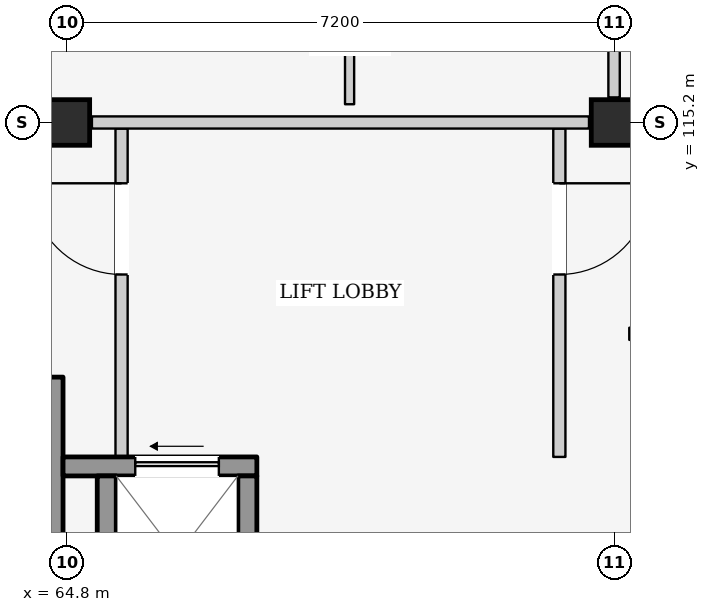
"""IFC4 building model, lengths in metres.
Left out: names, types, materials, properties, quantities, classifications, styles, units other than length and angle.
Written with IfcOpenShell. Run it as: python <this file> out.ifc"""

import sys

from ifc_helpers import new_model, si_unit, direction, frame, frame_2d, origin, origin_2d, place, context, subcontext, project, spatial, rectangle, extrude, element, fill, save


model = new_model("IFC4")
c1 = context("Model", 3, precision=1e-05, world=origin(), true_north=direction((0.0, 1.0)))
c2 = subcontext(c1, "Body", "Model", "MODEL_VIEW")
j1 = project(units=[si_unit("LENGTHUNIT", "METRE"), si_unit("PLANEANGLEUNIT", "RADIAN")], contexts=[c1])
p1 = place(None, origin())
s1 = spatial("IfcSite", under=j1, at=p1, CompositionType="ELEMENT")
p2 = place(p1, origin())
s2 = spatial("IfcBuilding", under=s1, at=p2, CompositionType="ELEMENT")
p3 = place(p2, frame((0.0, 0.0, 25.1)))
s3 = spatial("IfcBuildingStorey", under=s2, at=p3, CompositionType="ELEMENT", Elevation=25.1)
for number, where, z_axis, x_axis in (
    (1, (64.8, 115.2, 0.0), (0.0, 0.0, 1.0), (1.0, 0.0, 0.0)),
    (2, (72.0, 115.2, 0.0), (0.0, 0.0, 1.0), (1.0, 0.0, 0.0)),
):
    element("IfcColumn", number, at=place(p3, frame(where, z_axis=z_axis, x_axis=x_axis)), inside=s3, PredefinedType="COLUMN", context=c2, shape_type="SweptSolid", body=[
        extrude(rectangle(XDim=0.6, YDim=0.6, at=origin_2d()), origin(), (0.0, 0.0, 1.0), 3.2),
    ])
p4 = place(p3, frame((64.6, 108.15, 0.0), z_axis=(0.0, 0.0, 1.0), x_axis=(0.0, 1.0, 0.0)))
e3 = element("IfcWall", 3, at=p4, inside=s3, PredefinedType="SHEAR", context=c2, shape_type="SweptSolid", body=[
    extrude(rectangle(XDim=3.7, YDim=0.3, at=frame_2d((1.85, 0.0))), origin(), (0.0, 0.0, 1.0), 2.99),
])
p5 = place(p3, frame((65.52, 110.8, 0.0), z_axis=(0.0, 0.0, 1.0), x_axis=(0.0, 1.0, 0.0)))
e4 = element("IfcWall", 4, at=p5, inside=s3, PredefinedType="PARTITIONING", context=c2, shape_type="SweptSolid", body=[
    extrude(rectangle(XDim=4.32, YDim=0.16, at=frame_2d((2.16, 0.0))), origin(), (0.0, 0.0, 1.0), 2.99),
])
p6 = place(p5, frame((2.4, 0.0, 0.0)))
e5 = element("IfcOpeningElement", 5, at=p6, cuts=e4, PredefinedType="OPENING", context=c2, shape_type="SweptSolid", body=[
    extrude(rectangle(XDim=1.2, YDim=2.2, at=frame_2d((0.6, 1.1))), frame((0.0, 0.095, 0.0), z_axis=(0.0, -1.0, 0.0), x_axis=(1.0, 0.0, 0.0)), (0.0, 0.0, 1.0), 0.19),
])
p7 = place(p3, frame((71.28, 110.8, 0.0), z_axis=(0.0, 0.0, 1.0), x_axis=(0.0, 1.0, 0.0)))
e6 = element("IfcWall", 6, at=p7, inside=s3, PredefinedType="PARTITIONING", context=c2, shape_type="SweptSolid", body=[
    extrude(rectangle(XDim=4.32, YDim=0.16, at=frame_2d((2.16, 0.0))), origin(), (0.0, 0.0, 1.0), 2.99),
])
p8 = place(p7, frame((2.4, 0.0, 0.0)))
e7 = element("IfcOpeningElement", 7, at=p8, cuts=e6, PredefinedType="OPENING", context=c2, shape_type="SweptSolid", body=[
    extrude(rectangle(XDim=1.2, YDim=2.2, at=frame_2d((0.6, 1.1))), frame((0.0, 0.095, 0.0), z_axis=(0.0, -1.0, 0.0), x_axis=(1.0, 0.0, 0.0)), (0.0, 0.0, 1.0), 0.19),
])
p9 = place(p3, frame((64.75, 110.675, 0.0), z_axis=(0.0, 0.0, 1.0), x_axis=(1.0, 0.0, 0.0)))
e8 = element("IfcWall", 8, at=p9, inside=s3, PredefinedType="SHEAR", context=c2, shape_type="SweptSolid", body=[
    extrude(rectangle(XDim=2.55, YDim=0.25, at=frame_2d((1.275, 0.0))), origin(), (0.0, 0.0, 1.0), 2.99),
])
p10 = place(p9, frame((0.95, 0.0, 0.0)))
e9 = element("IfcOpeningElement", 9, at=p10, cuts=e8, PredefinedType="OPENING", context=c2, shape_type="SweptSolid", body=[
    extrude(rectangle(XDim=1.1, YDim=2.15, at=frame_2d((0.55, 1.075))), frame((0.0, 0.14, 0.0), z_axis=(0.0, -1.0, 0.0), x_axis=(1.0, 0.0, 0.0)), (0.0, 0.0, 1.0), 0.28),
])
for number, where, z_axis, x_axis in (
    (10, (65.325, 108.45, 0.0), (0.0, 0.0, 1.0), (0.0, 1.0, 0.0)),
    (11, (67.175, 108.45, 0.0), (0.0, 0.0, 1.0), (0.0, 1.0, 0.0)),
):
    element("IfcWall", number, at=place(p3, frame(where, z_axis=z_axis, x_axis=x_axis)), inside=s3, PredefinedType="SHEAR", context=c2, shape_type="SweptSolid", body=[
        extrude(rectangle(XDim=2.1, YDim=0.25, at=frame_2d((1.05, 0.0))), origin(), (0.0, 0.0, 1.0), 2.99),
    ])
p11 = place(p3, frame((65.13, 115.2, 0.0), z_axis=(0.0, 0.0, 1.0), x_axis=(1.0, 0.0, 0.0)))
e12 = element("IfcWall", 12, at=p11, inside=s3, PredefinedType="PARTITIONING", context=c2, shape_type="SweptSolid", body=[
    extrude(rectangle(XDim=6.54, YDim=0.16, at=frame_2d((3.27, 0.0))), origin(), (0.0, 0.0, 1.0), 2.325),
])
p12 = place(p3, frame((72.0, 115.53, 0.0), z_axis=(0.0, 0.0, 1.0), x_axis=(0.0, 1.0, 0.0)))
e13 = element("IfcWall", 13, at=p12, inside=s3, PredefinedType="PARTITIONING", context=c2, shape_type="SweptSolid", body=[
    extrude(rectangle(XDim=6.54, YDim=0.15, at=frame_2d((3.27, 0.0))), origin(), (0.0, 0.0, 1.0), 2.475),
])
p13 = place(p3, frame((68.52, 115.44, 0.0), z_axis=(0.0, 0.0, 1.0), x_axis=(0.0, 1.0, 0.0)))
e14 = element("IfcWall", 14, at=p13, inside=s3, PredefinedType="PARTITIONING", context=c2, shape_type="SweptSolid", body=[
    extrude(rectangle(XDim=3.04, YDim=0.12, at=frame_2d((1.52, 0.0))), origin(), (0.0, 0.0, 1.0), 2.99),
])
p14 = place(p13, frame((1.04, 0.0, 0.0)))
e15 = element("IfcOpeningElement", 15, at=p14, cuts=e14, PredefinedType="OPENING", context=c2, shape_type="SweptSolid", body=[
    extrude(rectangle(XDim=0.96, YDim=2.15, at=frame_2d((0.48, 1.075))), frame((0.0, 0.075, 0.0), z_axis=(0.0, -1.0, 0.0), x_axis=(1.0, 0.0, 0.0)), (0.0, 0.0, 1.0), 0.15),
])
p15 = place(p3, frame((72.2, 112.42, 0.0), z_axis=(0.0, 0.0, 1.0), x_axis=(1.0, 0.0, 0.0)))
e16 = element("IfcWall", 16, at=p15, inside=s3, PredefinedType="PARTITIONING", context=c2, shape_type="SweptSolid", body=[
    extrude(rectangle(XDim=6.8, YDim=0.16, at=frame_2d((3.4, 0.0))), origin(), (0.0, 0.0, 1.0), 2.99),
])
p16 = place(p15, frame((2.93, 0.0, 0.0)))
e17 = element("IfcOpeningElement", 17, at=p16, cuts=e16, PredefinedType="OPENING", context=c2, shape_type="SweptSolid", body=[
    extrude(rectangle(XDim=0.94, YDim=2.12, at=frame_2d((0.47, 1.06))), frame((0.0, 0.095, 0.0), z_axis=(0.0, -1.0, 0.0), x_axis=(1.0, 0.0, 0.0)), (0.0, 0.0, 1.0), 0.19),
])
p17 = place(p6, origin())
e18 = element("IfcDoor", 18, at=p17, inside=s3, OperationType="SINGLE_SWING_RIGHT", PredefinedType="DOOR", context=c2, shape_type="SweptSolid", body=[
    extrude(rectangle(XDim=1.2, YDim=2.2, at=frame_2d((0.6, 1.1))), frame((0.0, 0.025, 0.0), z_axis=(0.0, -1.0, 0.0), x_axis=(1.0, 0.0, 0.0)), (0.0, 0.0, 1.0), 0.05),
])
fill(e5, e18)
p18 = place(p8, frame((1.2, 0.0, 0.0), z_axis=(0.0, 0.0, 1.0), x_axis=(-1.0, 0.0, 0.0)))
e19 = element("IfcDoor", 19, at=p18, inside=s3, OperationType="SINGLE_SWING_LEFT", PredefinedType="DOOR", context=c2, shape_type="SweptSolid", body=[
    extrude(rectangle(XDim=1.2, YDim=2.2, at=frame_2d((0.6, 1.1))), frame((0.0, 0.025, 0.0), z_axis=(0.0, -1.0, 0.0), x_axis=(1.0, 0.0, 0.0)), (0.0, 0.0, 1.0), 0.05),
])
fill(e7, e19)
p19 = place(p10, origin())
e20 = element("IfcDoor", 20, at=p19, inside=s3, OperationType="SLIDING_TO_LEFT", PredefinedType="DOOR", context=c2, shape_type="SweptSolid", body=[
    extrude(rectangle(XDim=1.1, YDim=2.15, at=frame_2d((0.55, 1.075))), frame((0.0, 0.025, 0.0), z_axis=(0.0, -1.0, 0.0), x_axis=(1.0, 0.0, 0.0)), (0.0, 0.0, 1.0), 0.05),
])
fill(e9, e20)
save(model, sys.argv[1])
